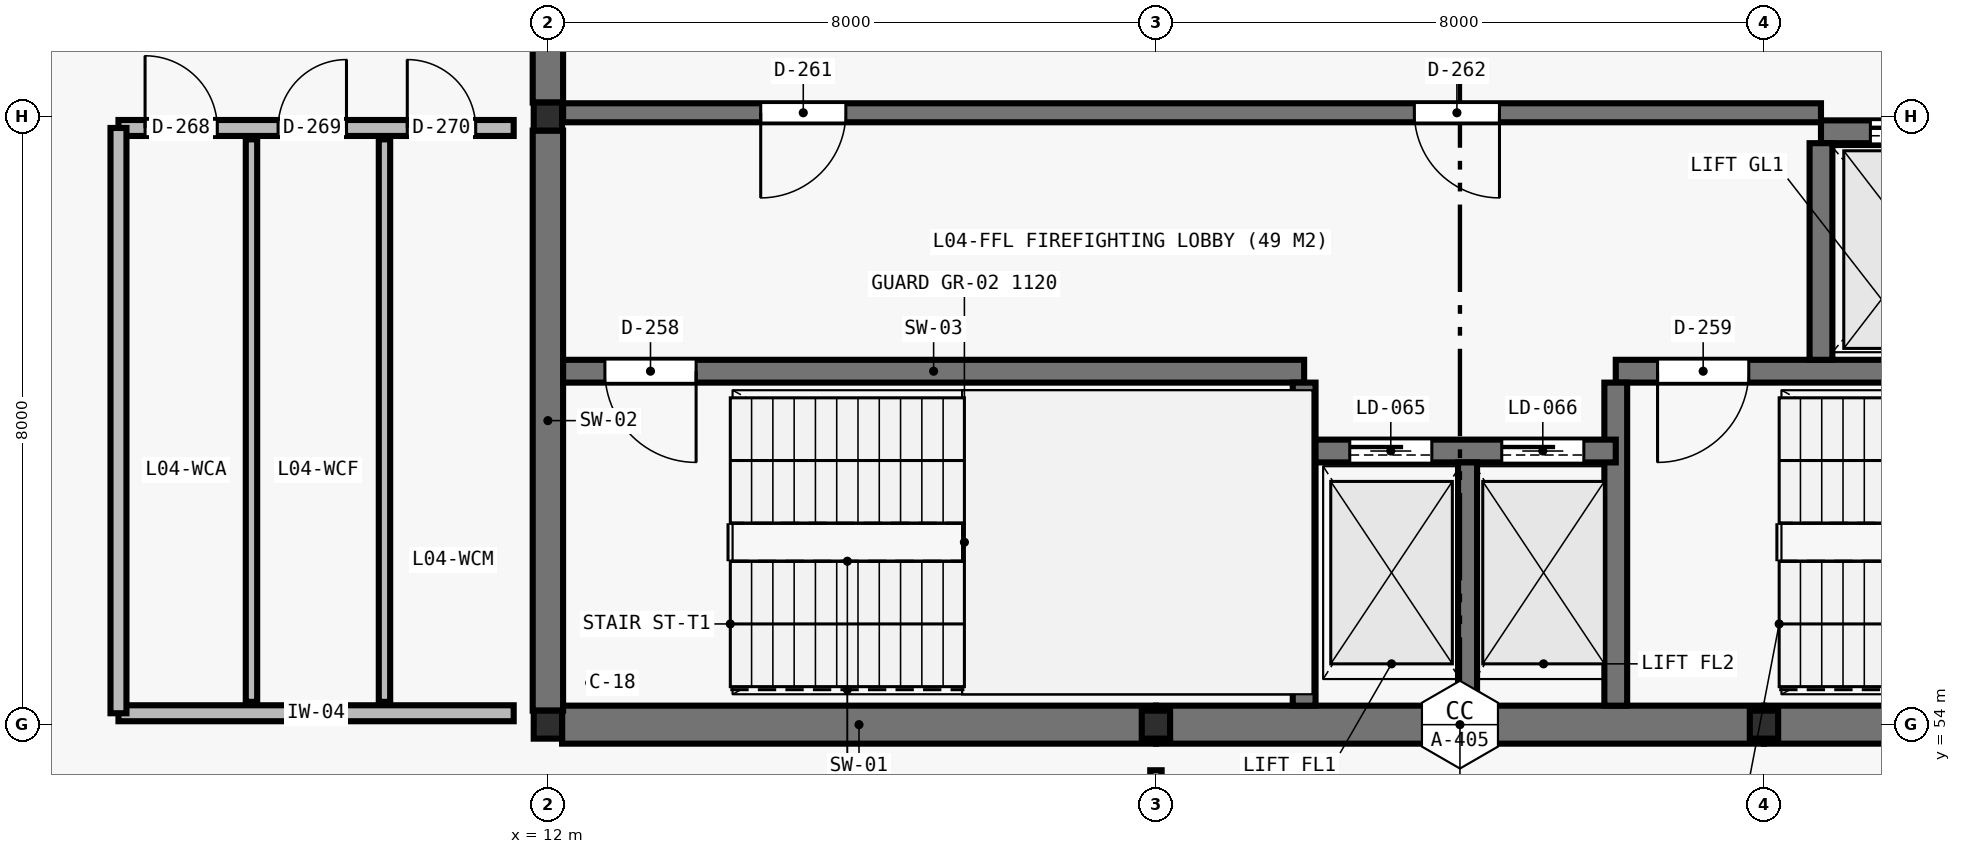
"""IFC4 building model, lengths in metres.
Left out: names, types, materials, properties, quantities, classifications, styles, units other than length and angle.
Written with IfcOpenShell. Run it as: python <this file> out.ifc"""

import sys

from ifc_helpers import new_model, si_unit, direction, frame, frame_2d, origin, origin_2d, place, context, subcontext, project, spatial, rectangle, i_section, extrude, element, fill, save


model = new_model("IFC4")
c1 = context("Model", 3, precision=1e-05, world=origin(), true_north=direction((0.0, 1.0)))
c2 = subcontext(c1, "Body", "Model", "MODEL_VIEW")
j1 = project(units=[si_unit("LENGTHUNIT", "METRE"), si_unit("PLANEANGLEUNIT", "RADIAN")], contexts=[c1])
p1 = place(None, origin())
s1 = spatial("IfcSite", under=j1, at=p1, CompositionType="ELEMENT")
p2 = place(p1, origin())
s2 = spatial("IfcBuilding", under=s1, at=p2, CompositionType="ELEMENT")
p3 = place(p2, frame((0.0, 0.0, 19.6)))
s3 = spatial("IfcBuildingStorey", under=s2, at=p3, CompositionType="ELEMENT", Elevation=19.6)
for number, where, z_axis, x_axis in (
    (1, (12.0, 54.0, 0.0), (0.0, 0.0, 1.0), (1.0, 0.0, 0.0)),
    (2, (12.0, 62.0, 0.0), (0.0, 0.0, 1.0), (1.0, 0.0, 0.0)),
    (3, (20.0, 54.0, 0.0), (0.0, 0.0, 1.0), (1.0, 0.0, 0.0)),
    (4, (28.0, 54.0, 0.0), (0.0, 0.0, 1.0), (1.0, 0.0, 0.0)),
):
    element("IfcColumn", number, at=place(p3, frame(where, z_axis=z_axis, x_axis=x_axis)), inside=s3, PredefinedType="COLUMN", context=c2, shape_type="SweptSolid", body=[
        extrude(i_section(OverallWidth=0.373, OverallDepth=0.368, WebThickness=0.015, FlangeThickness=0.024, at=origin_2d()), origin(), (0.0, 0.0, 1.0), 4.02),
    ])
p4 = place(p3, frame((12.187, 54.0, 0.0), z_axis=(0.0, 0.0, 1.0), x_axis=(1.0, 0.0, 0.0)))
e5 = element("IfcWall", 5, at=p4, inside=s3, PredefinedType="SHEAR", context=c2, shape_type="SweptSolid", body=[
    extrude(rectangle(XDim=7.813, YDim=0.5, at=frame_2d((3.907, 0.0))), origin(), (0.0, 0.0, 1.0), 4.02),
])
p5 = place(p3, frame((20.0, 54.0, 0.0), z_axis=(0.0, 0.0, 1.0), x_axis=(1.0, 0.0, 0.0)))
e6 = element("IfcWall", 6, at=p5, inside=s3, PredefinedType="SHEAR", context=c2, shape_type="SweptSolid", body=[
    extrude(rectangle(XDim=8.0, YDim=0.5, at=frame_2d((4.0, 0.0))), origin(), (0.0, 0.0, 1.0), 4.02),
])
p6 = place(p3, frame((28.0, 54.0, 0.0), z_axis=(0.0, 0.0, 1.0), x_axis=(1.0, 0.0, 0.0)))
e7 = element("IfcWall", 7, at=p6, inside=s3, PredefinedType="SHEAR", context=c2, shape_type="SweptSolid", body=[
    extrude(rectangle(XDim=7.813, YDim=0.5, at=frame_2d((3.907, 0.0))), origin(), (0.0, 0.0, 1.0), 4.02),
])
p7 = place(p3, frame((12.0, 54.184, 0.0), z_axis=(0.0, 0.0, 1.0), x_axis=(0.0, 1.0, 0.0)))
e8 = element("IfcWall", 8, at=p7, inside=s3, PredefinedType="SHEAR", context=c2, shape_type="SweptSolid", body=[
    extrude(rectangle(XDim=7.632, YDim=0.4, at=frame_2d((3.816, 0.0))), origin(), (0.0, 0.0, 1.0), 4.02),
])
p8 = place(p3, frame((12.0, 62.184, 0.0), z_axis=(0.0, 0.0, 1.0), x_axis=(0.0, 1.0, 0.0)))
e9 = element("IfcWall", 9, at=p8, inside=s3, PredefinedType="SHEAR", context=c2, shape_type="SweptSolid", body=[
    extrude(rectangle(XDim=7.632, YDim=0.4, at=frame_2d((3.816, 0.0))), origin(), (0.0, 0.0, 1.0), 4.02),
])
p9 = place(p8, frame((0.716, 0.0, 0.0)))
e10 = element("IfcOpeningElement", 10, at=p9, cuts=e9, PredefinedType="OPENING", context=c2, shape_type="SweptSolid", body=[
    extrude(rectangle(XDim=1.8, YDim=2.2, at=frame_2d((0.9, 1.1))), frame((0.0, 0.21, 0.0), z_axis=(0.0, -1.0, 0.0), x_axis=(1.0, 0.0, 0.0)), (0.0, 0.0, 1.0), 0.42),
])
p10 = place(p3, frame((12.2, 58.65, 0.0), z_axis=(0.0, 0.0, 1.0), x_axis=(1.0, 0.0, 0.0)))
e11 = element("IfcWall", 11, at=p10, inside=s3, PredefinedType="SHEAR", context=c2, shape_type="SweptSolid", body=[
    extrude(rectangle(XDim=9.75, YDim=0.3, at=frame_2d((4.875, 0.0))), origin(), (0.0, 0.0, 1.0), 4.02),
])
p11 = place(p10, frame((0.55, 0.0, 0.0)))
e12 = element("IfcOpeningElement", 12, at=p11, cuts=e11, PredefinedType="OPENING", context=c2, shape_type="SweptSolid", body=[
    extrude(rectangle(XDim=1.2, YDim=2.2, at=frame_2d((0.6, 1.1))), frame((0.0, 0.16, 0.0), z_axis=(0.0, -1.0, 0.0), x_axis=(1.0, 0.0, 0.0)), (0.0, 0.0, 1.0), 0.32),
])
p12 = place(p3, frame((21.95, 54.25, 0.0), z_axis=(0.0, 0.0, 1.0), x_axis=(0.0, 1.0, 0.0)))
e13 = element("IfcWall", 13, at=p12, inside=s3, PredefinedType="SHEAR", context=c2, shape_type="SweptSolid", body=[
    extrude(rectangle(XDim=4.25, YDim=0.3, at=frame_2d((2.125, 0.0))), origin(), (0.0, 0.0, 1.0), 4.02),
])
p13 = place(p3, frame((26.05, 58.65, 0.0), z_axis=(0.0, 0.0, 1.0), x_axis=(1.0, 0.0, 0.0)))
e14 = element("IfcWall", 14, at=p13, inside=s3, PredefinedType="SHEAR", context=c2, shape_type="SweptSolid", body=[
    extrude(rectangle(XDim=9.75, YDim=0.3, at=frame_2d((4.875, 0.0))), origin(), (0.0, 0.0, 1.0), 4.02),
])
p14 = place(p13, frame((0.55, 0.0, 0.0)))
e15 = element("IfcOpeningElement", 15, at=p14, cuts=e14, PredefinedType="OPENING", context=c2, shape_type="SweptSolid", body=[
    extrude(rectangle(XDim=1.2, YDim=2.2, at=frame_2d((0.6, 1.1))), frame((0.0, 0.16, 0.0), z_axis=(0.0, -1.0, 0.0), x_axis=(1.0, 0.0, 0.0)), (0.0, 0.0, 1.0), 0.32),
])
p15 = place(p3, frame((26.05, 54.25, 0.0), z_axis=(0.0, 0.0, 1.0), x_axis=(0.0, 1.0, 0.0)))
e16 = element("IfcWall", 16, at=p15, inside=s3, PredefinedType="SHEAR", context=c2, shape_type="SweptSolid", body=[
    extrude(rectangle(XDim=4.25, YDim=0.3, at=frame_2d((2.125, 0.0))), origin(), (0.0, 0.0, 1.0), 4.02),
])
p16 = place(p3, frame((22.1, 57.6, 0.0), z_axis=(0.0, 0.0, 1.0), x_axis=(1.0, 0.0, 0.0)))
e17 = element("IfcWall", 17, at=p16, inside=s3, PredefinedType="SHEAR", context=c2, shape_type="SweptSolid", body=[
    extrude(rectangle(XDim=3.95, YDim=0.3, at=frame_2d((1.975, 0.0))), origin(), (0.0, 0.0, 1.0), 4.02),
])
p17 = place(p16, frame((0.45, 0.0, 0.0)))
e18 = element("IfcOpeningElement", 18, at=p17, cuts=e17, PredefinedType="OPENING", context=c2, shape_type="SweptSolid", body=[
    extrude(rectangle(XDim=1.08, YDim=2.2, at=frame_2d((0.54, 1.1))), frame((0.0, 0.16, 0.0), z_axis=(0.0, -1.0, 0.0), x_axis=(1.0, 0.0, 0.0)), (0.0, 0.0, 1.0), 0.32),
])
p18 = place(p16, frame((2.45, 0.0, 0.0)))
e19 = element("IfcOpeningElement", 19, at=p18, cuts=e17, PredefinedType="OPENING", context=c2, shape_type="SweptSolid", body=[
    extrude(rectangle(XDim=1.08, YDim=2.2, at=frame_2d((0.54, 1.1))), frame((0.0, 0.16, 0.0), z_axis=(0.0, -1.0, 0.0), x_axis=(1.0, 0.0, 0.0)), (0.0, 0.0, 1.0), 0.32),
])
p19 = place(p3, frame((24.1, 54.25, 0.0), z_axis=(0.0, 0.0, 1.0), x_axis=(0.0, 1.0, 0.0)))
e20 = element("IfcWall", 20, at=p19, inside=s3, PredefinedType="SHEAR", context=c2, shape_type="SweptSolid", body=[
    extrude(rectangle(XDim=3.2, YDim=0.25, at=frame_2d((1.6, 0.0))), origin(), (0.0, 0.0, 1.0), 4.02),
])
p20 = place(p3, frame((28.75, 61.8, 0.0), z_axis=(0.0, 0.0, 1.0), x_axis=(1.0, 0.0, 0.0)))
e21 = element("IfcWall", 21, at=p20, inside=s3, PredefinedType="SHEAR", context=c2, shape_type="SweptSolid", body=[
    extrude(rectangle(XDim=5.0, YDim=0.3, at=frame_2d((2.5, 0.0))), origin(), (0.0, 0.0, 1.0), 4.02),
])
p21 = place(p20, frame((0.65, 0.0, 0.0)))
e22 = element("IfcOpeningElement", 22, at=p21, cuts=e21, PredefinedType="OPENING", context=c2, shape_type="SweptSolid", body=[
    extrude(rectangle(XDim=1.3, YDim=2.3, at=frame_2d((0.65, 1.15))), frame((0.0, 0.16, 0.0), z_axis=(0.0, -1.0, 0.0), x_axis=(1.0, 0.0, 0.0)), (0.0, 0.0, 1.0), 0.32),
])
p22 = place(p20, frame((3.1, 0.0, 0.0)))
e23 = element("IfcOpeningElement", 23, at=p22, cuts=e21, PredefinedType="OPENING", context=c2, shape_type="SweptSolid", body=[
    extrude(rectangle(XDim=1.08, YDim=2.2, at=frame_2d((0.54, 1.1))), frame((0.0, 0.16, 0.0), z_axis=(0.0, -1.0, 0.0), x_axis=(1.0, 0.0, 0.0)), (0.0, 0.0, 1.0), 0.32),
])
p23 = place(p3, frame((28.75, 58.8, 0.0), z_axis=(0.0, 0.0, 1.0), x_axis=(0.0, 1.0, 0.0)))
e24 = element("IfcWall", 24, at=p23, inside=s3, PredefinedType="SHEAR", context=c2, shape_type="SweptSolid", body=[
    extrude(rectangle(XDim=2.85, YDim=0.3, at=frame_2d((1.425, 0.0))), origin(), (0.0, 0.0, 1.0), 4.02),
])
p24 = place(p3, frame((12.2, 62.05, 0.0), z_axis=(0.0, 0.0, 1.0), x_axis=(1.0, 0.0, 0.0)))
e25 = element("IfcWall", 25, at=p24, inside=s3, PredefinedType="SHEAR", context=c2, shape_type="SweptSolid", body=[
    extrude(rectangle(XDim=16.55, YDim=0.25, at=frame_2d((8.275, 0.0))), origin(), (0.0, 0.0, 1.0), 4.02),
])
p25 = place(p24, frame((2.6, 0.0, 0.0)))
e26 = element("IfcOpeningElement", 26, at=p25, cuts=e25, PredefinedType="OPENING", context=c2, shape_type="SweptSolid", body=[
    extrude(rectangle(XDim=1.12, YDim=2.22, at=frame_2d((0.56, 1.11))), frame((0.0, 0.135, 0.0), z_axis=(0.0, -1.0, 0.0), x_axis=(1.0, 0.0, 0.0)), (0.0, 0.0, 1.0), 0.27),
])
p26 = place(p24, frame((11.2, 0.0, 0.0)))
e27 = element("IfcOpeningElement", 27, at=p26, cuts=e25, PredefinedType="OPENING", context=c2, shape_type="SweptSolid", body=[
    extrude(rectangle(XDim=1.12, YDim=2.22, at=frame_2d((0.56, 1.11))), frame((0.0, 0.135, 0.0), z_axis=(0.0, -1.0, 0.0), x_axis=(1.0, 0.0, 0.0)), (0.0, 0.0, 1.0), 0.27),
])
p27 = place(p3, frame((6.35, 61.85, 0.0), z_axis=(0.0, 0.0, 1.0), x_axis=(1.0, 0.0, 0.0)))
e28 = element("IfcWall", 28, at=p27, inside=s3, PredefinedType="PLUMBINGWALL", context=c2, shape_type="SweptSolid", body=[
    extrude(rectangle(XDim=5.2, YDim=0.21, at=frame_2d((2.6, 0.0))), origin(), (0.0, 0.0, 1.0), 4.02),
])
p28 = place(p27, frame((0.35, 0.0, 0.0)))
e29 = element("IfcOpeningElement", 29, at=p28, cuts=e28, PredefinedType="OPENING", context=c2, shape_type="SweptSolid", body=[
    extrude(rectangle(XDim=0.95, YDim=2.1, at=frame_2d((0.475, 1.05))), frame((0.0, 0.115, 0.0), z_axis=(0.0, -1.0, 0.0), x_axis=(1.0, 0.0, 0.0)), (0.0, 0.0, 1.0), 0.23),
])
p29 = place(p27, frame((2.1, 0.0, 0.0)))
e30 = element("IfcOpeningElement", 30, at=p29, cuts=e28, PredefinedType="OPENING", context=c2, shape_type="SweptSolid", body=[
    extrude(rectangle(XDim=0.9, YDim=2.1, at=frame_2d((0.45, 1.05))), frame((0.0, 0.115, 0.0), z_axis=(0.0, -1.0, 0.0), x_axis=(1.0, 0.0, 0.0)), (0.0, 0.0, 1.0), 0.23),
])
p30 = place(p27, frame((3.8, 0.0, 0.0)))
e31 = element("IfcOpeningElement", 31, at=p30, cuts=e28, PredefinedType="OPENING", context=c2, shape_type="SweptSolid", body=[
    extrude(rectangle(XDim=0.9, YDim=2.1, at=frame_2d((0.45, 1.05))), frame((0.0, 0.115, 0.0), z_axis=(0.0, -1.0, 0.0), x_axis=(1.0, 0.0, 0.0)), (0.0, 0.0, 1.0), 0.23),
])
p31 = place(p3, frame((6.35, 54.15, 0.0), z_axis=(0.0, 0.0, 1.0), x_axis=(1.0, 0.0, 0.0)))
e32 = element("IfcWall", 32, at=p31, inside=s3, PredefinedType="PLUMBINGWALL", context=c2, shape_type="SweptSolid", body=[
    extrude(rectangle(XDim=5.2, YDim=0.21, at=frame_2d((2.6, 0.0))), origin(), (0.0, 0.0, 1.0), 4.02),
])
p32 = place(p3, frame((6.35, 54.15, 0.0), z_axis=(0.0, 0.0, 1.0), x_axis=(0.0, 1.0, 0.0)))
e33 = element("IfcWall", 33, at=p32, inside=s3, PredefinedType="PLUMBINGWALL", context=c2, shape_type="SweptSolid", body=[
    extrude(rectangle(XDim=7.7, YDim=0.21, at=frame_2d((3.85, 0.0))), origin(), (0.0, 0.0, 1.0), 4.02),
])
for number, where, z_axis, x_axis in (
    (34, (8.1, 54.3, 0.0), (0.0, 0.0, 1.0), (0.0, 1.0, 0.0)),
    (35, (9.85, 54.3, 0.0), (0.0, 0.0, 1.0), (0.0, 1.0, 0.0)),
):
    element("IfcWall", number, at=place(p3, frame(where, z_axis=z_axis, x_axis=x_axis)), inside=s3, PredefinedType="PARTITIONING", context=c2, shape_type="SweptSolid", body=[
        extrude(rectangle(XDim=7.4, YDim=0.15, at=frame_2d((3.7, 0.0))), origin(), (0.0, 0.0, 1.0), 4.02),
    ])
p33 = place(p3, frame((20.0, 46.6, 0.0), z_axis=(0.0, 0.0, 1.0), x_axis=(0.0, 1.0, 0.0)))
e36 = element("IfcWall", 36, at=p33, inside=s3, PredefinedType="PARTITIONING", context=c2, shape_type="SweptSolid", body=[
    extrude(rectangle(XDim=6.8, YDim=0.15, at=frame_2d((3.4, 0.0))), origin(), (0.0, 0.0, 1.0), 3.56),
])
p34 = place(p33, frame((2.8, 0.0, 0.0)))
e37 = element("IfcOpeningElement", 37, at=p34, cuts=e36, PredefinedType="OPENING", context=c2, shape_type="SweptSolid", body=[
    extrude(rectangle(XDim=0.95, YDim=2.1, at=frame_2d((0.475, 1.05))), frame((0.0, 0.085, 0.0), z_axis=(0.0, -1.0, 0.0), x_axis=(1.0, 0.0, 0.0)), (0.0, 0.0, 1.0), 0.17),
])
p35 = place(p11, frame((1.2, 0.0, 0.0), z_axis=(0.0, 0.0, 1.0), x_axis=(-1.0, 0.0, 0.0)))
e38 = element("IfcDoor", 38, at=p35, inside=s3, OperationType="SINGLE_SWING_LEFT", PredefinedType="DOOR", context=c2, shape_type="SweptSolid", body=[
    extrude(rectangle(XDim=1.2, YDim=2.2, at=frame_2d((0.6, 1.1))), frame((0.0, 0.025, 0.0), z_axis=(0.0, -1.0, 0.0), x_axis=(1.0, 0.0, 0.0)), (0.0, 0.0, 1.0), 0.05),
])
fill(e12, e38)
p36 = place(p14, frame((1.2, 0.0, 0.0), z_axis=(0.0, 0.0, 1.0), x_axis=(-1.0, 0.0, 0.0)))
e39 = element("IfcDoor", 39, at=p36, inside=s3, OperationType="SINGLE_SWING_RIGHT", PredefinedType="DOOR", context=c2, shape_type="SweptSolid", body=[
    extrude(rectangle(XDim=1.2, YDim=2.2, at=frame_2d((0.6, 1.1))), frame((0.0, 0.025, 0.0), z_axis=(0.0, -1.0, 0.0), x_axis=(1.0, 0.0, 0.0)), (0.0, 0.0, 1.0), 0.05),
])
fill(e15, e39)
p37 = place(p17, origin())
e40 = element("IfcDoor", 40, at=p37, inside=s3, OperationType="SLIDING_TO_LEFT", PredefinedType="DOOR", context=c2, shape_type="SweptSolid", body=[
    extrude(rectangle(XDim=1.08, YDim=2.2, at=frame_2d((0.54, 1.1))), frame((0.0, 0.025, 0.0), z_axis=(0.0, -1.0, 0.0), x_axis=(1.0, 0.0, 0.0)), (0.0, 0.0, 1.0), 0.05),
])
fill(e18, e40)
p38 = place(p18, origin())
e41 = element("IfcDoor", 41, at=p38, inside=s3, OperationType="SLIDING_TO_LEFT", PredefinedType="DOOR", context=c2, shape_type="SweptSolid", body=[
    extrude(rectangle(XDim=1.08, YDim=2.2, at=frame_2d((0.54, 1.1))), frame((0.0, 0.025, 0.0), z_axis=(0.0, -1.0, 0.0), x_axis=(1.0, 0.0, 0.0)), (0.0, 0.0, 1.0), 0.05),
])
fill(e19, e41)
p39 = place(p21, origin())
e42 = element("IfcDoor", 42, at=p39, inside=s3, OperationType="SLIDING_TO_LEFT", PredefinedType="DOOR", context=c2, shape_type="SweptSolid", body=[
    extrude(rectangle(XDim=1.3, YDim=2.3, at=frame_2d((0.65, 1.15))), frame((0.0, 0.025, 0.0), z_axis=(0.0, -1.0, 0.0), x_axis=(1.0, 0.0, 0.0)), (0.0, 0.0, 1.0), 0.05),
])
fill(e22, e42)
p40 = place(p25, frame((1.12, 0.0, 0.0), z_axis=(0.0, 0.0, 1.0), x_axis=(-1.0, 0.0, 0.0)))
e43 = element("IfcDoor", 43, at=p40, inside=s3, OperationType="SINGLE_SWING_RIGHT", PredefinedType="DOOR", context=c2, shape_type="SweptSolid", body=[
    extrude(rectangle(XDim=1.12, YDim=2.22, at=frame_2d((0.56, 1.11))), frame((0.0, 0.025, 0.0), z_axis=(0.0, -1.0, 0.0), x_axis=(1.0, 0.0, 0.0)), (0.0, 0.0, 1.0), 0.05),
])
fill(e26, e43)
p41 = place(p26, frame((1.12, 0.0, 0.0), z_axis=(0.0, 0.0, 1.0), x_axis=(-1.0, 0.0, 0.0)))
e44 = element("IfcDoor", 44, at=p41, inside=s3, OperationType="SINGLE_SWING_LEFT", PredefinedType="DOOR", context=c2, shape_type="SweptSolid", body=[
    extrude(rectangle(XDim=1.12, YDim=2.22, at=frame_2d((0.56, 1.11))), frame((0.0, 0.025, 0.0), z_axis=(0.0, -1.0, 0.0), x_axis=(1.0, 0.0, 0.0)), (0.0, 0.0, 1.0), 0.05),
])
fill(e27, e44)
p42 = place(p28, origin())
e45 = element("IfcDoor", 45, at=p42, inside=s3, OperationType="SINGLE_SWING_LEFT", PredefinedType="DOOR", context=c2, shape_type="SweptSolid", body=[
    extrude(rectangle(XDim=0.95, YDim=2.1, at=frame_2d((0.475, 1.05))), frame((0.0, 0.025, 0.0), z_axis=(0.0, -1.0, 0.0), x_axis=(1.0, 0.0, 0.0)), (0.0, 0.0, 1.0), 0.05),
])
fill(e29, e45)
p43 = place(p29, origin())
e46 = element("IfcDoor", 46, at=p43, inside=s3, OperationType="SINGLE_SWING_RIGHT", PredefinedType="DOOR", context=c2, shape_type="SweptSolid", body=[
    extrude(rectangle(XDim=0.9, YDim=2.1, at=frame_2d((0.45, 1.05))), frame((0.0, 0.025, 0.0), z_axis=(0.0, -1.0, 0.0), x_axis=(1.0, 0.0, 0.0)), (0.0, 0.0, 1.0), 0.05),
])
fill(e30, e46)
p44 = place(p30, origin())
e47 = element("IfcDoor", 47, at=p44, inside=s3, OperationType="SINGLE_SWING_LEFT", PredefinedType="DOOR", context=c2, shape_type="SweptSolid", body=[
    extrude(rectangle(XDim=0.9, YDim=2.1, at=frame_2d((0.45, 1.05))), frame((0.0, 0.025, 0.0), z_axis=(0.0, -1.0, 0.0), x_axis=(1.0, 0.0, 0.0)), (0.0, 0.0, 1.0), 0.05),
])
fill(e31, e47)
save(model, sys.argv[1])
